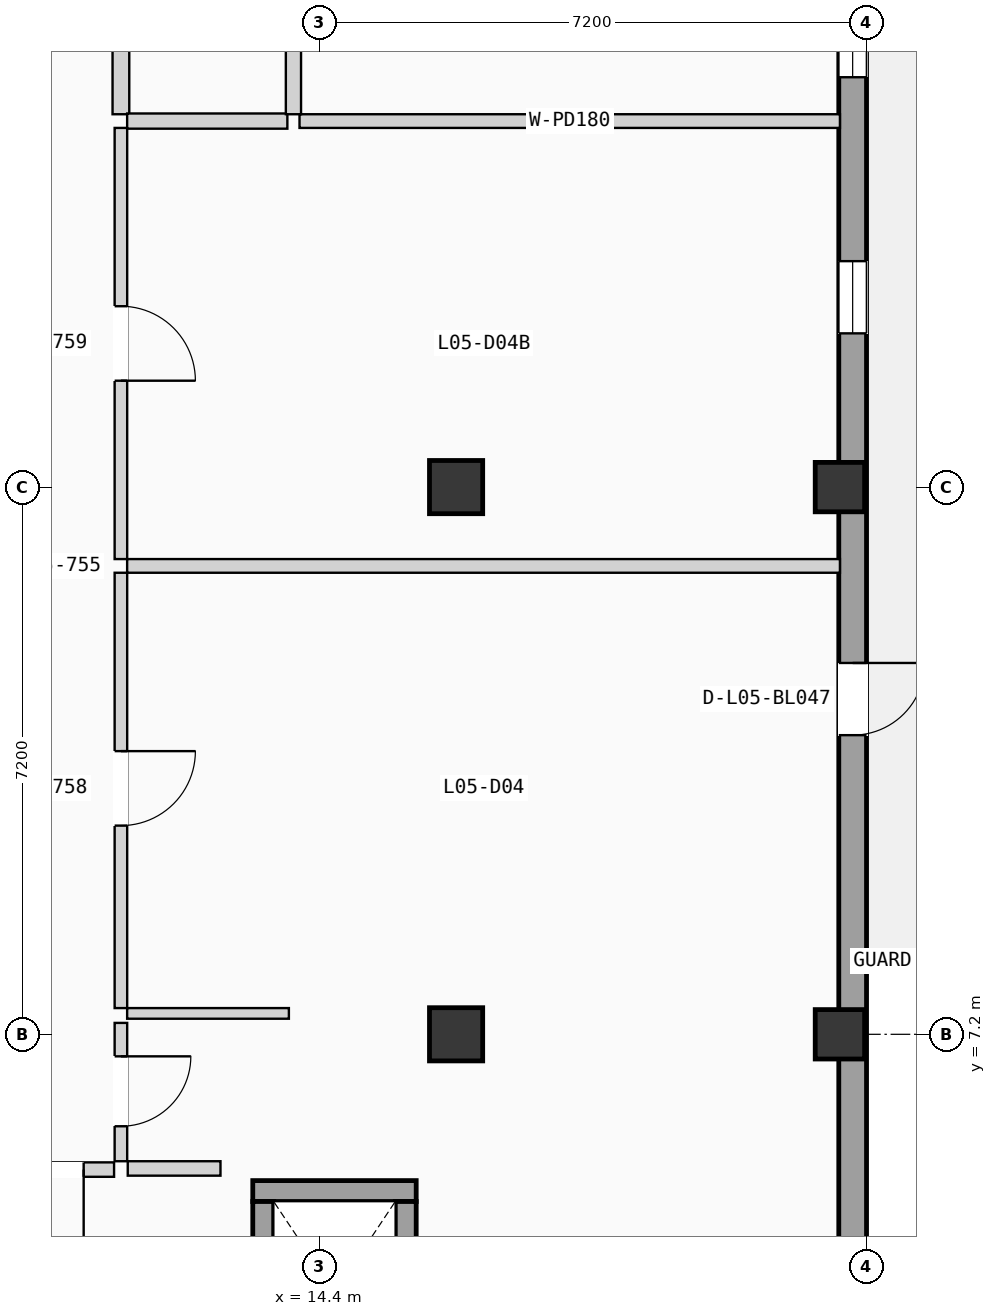
"""IFC4 building model, lengths in metres.
Left out: names, types, materials, properties, quantities, classifications, styles, units other than length and angle.
Written with IfcOpenShell. Run it as: python <this file> out.ifc"""

import sys

from ifc_helpers import new_model, si_unit, direction, frame, frame_2d, origin, origin_2d, place, context, subcontext, project, spatial, rectangle, extrude, element, fill, save


model = new_model("IFC4")
c1 = context("Model", 3, precision=1e-05, world=origin(), true_north=direction((0.0, 1.0)))
c2 = subcontext(c1, "Body", "Model", "MODEL_VIEW")
j1 = project(units=[si_unit("LENGTHUNIT", "METRE"), si_unit("PLANEANGLEUNIT", "RADIAN")], contexts=[c1])
p1 = place(None, origin())
s1 = spatial("IfcSite", under=j1, at=p1, CompositionType="ELEMENT")
p2 = place(p1, origin())
s2 = spatial("IfcBuilding", under=s1, at=p2, CompositionType="ELEMENT")
p3 = place(p2, frame((0.0, 0.0, 18.375)))
s3 = spatial("IfcBuildingStorey", under=s2, at=p3, CompositionType="ELEMENT", Elevation=18.375)
for number, where, z_axis, x_axis in (
    (1, (16.2, 7.2, 0.0), (0.0, 0.0, 1.0), (1.0, 0.0, 0.0)),
    (2, (16.2, 14.4, 0.0), (0.0, 0.0, 1.0), (1.0, 0.0, 0.0)),
):
    element("IfcColumn", number, at=place(p3, frame(where, z_axis=z_axis, x_axis=x_axis)), inside=s3, PredefinedType="COLUMN", context=c2, shape_type="SweptSolid", body=[
        extrude(rectangle(XDim=0.7, YDim=0.7, at=origin_2d()), origin(), (0.0, 0.0, 1.0), 3.15),
    ])
for number, where, z_axis, x_axis in (
    (3, (21.25, 7.2, 0.0), (0.0, 0.0, 1.0), (1.0, 0.0, 0.0)),
    (4, (21.25, 14.4, 0.0), (0.0, 0.0, 1.0), (1.0, 0.0, 0.0)),
):
    element("IfcColumn", number, at=place(p3, frame(where, z_axis=z_axis, x_axis=x_axis)), inside=s3, PredefinedType="COLUMN", context=c2, shape_type="SweptSolid", body=[
        extrude(rectangle(XDim=0.65, YDim=0.65, at=origin_2d()), origin(), (0.0, 0.0, 1.0), 3.15),
    ])
p4 = place(p3, frame((21.417, 0.365, 0.0), z_axis=(0.0, 0.0, 1.0), x_axis=(0.0, 1.0, 0.0)))
e5 = element("IfcWall", 5, at=p4, inside=s3, PredefinedType="SOLIDWALL", context=c2, shape_type="SweptSolid", body=[
    extrude(rectangle(XDim=49.67, YDim=0.365, at=frame_2d((24.835, 0.0))), origin(), (0.0, 0.0, 1.0), 2.89),
])
p5 = place(p4, frame((10.771, 0.0, 0.0)))
e6 = element("IfcOpeningElement", 6, at=p5, cuts=e5, PredefinedType="OPENING", context=c2, shape_type="SweptSolid", body=[
    extrude(rectangle(XDim=0.95, YDim=2.15, at=frame_2d((0.475, 1.075))), frame((0.0, 0.192, 0.0), z_axis=(0.0, -1.0, 0.0), x_axis=(1.0, 0.0, 0.0)), (0.0, 0.0, 1.0), 0.385),
])
p6 = place(p4, frame((16.058, 0.0, 0.555)))
e7 = element("IfcOpeningElement", 7, at=p6, cuts=e5, PredefinedType="OPENING", context=c2, shape_type="SweptSolid", body=[
    extrude(rectangle(XDim=0.95, YDim=1.65, at=frame_2d((0.475, 0.825))), frame((0.0, 0.192, 0.0), z_axis=(0.0, -1.0, 0.0), x_axis=(1.0, 0.0, 0.0)), (0.0, 0.0, 1.0), 0.385),
])
p7 = place(p4, frame((24.36, 0.0, 0.85)))
e8 = element("IfcOpeningElement", 8, at=p7, cuts=e5, PredefinedType="OPENING", context=c2, shape_type="SweptSolid", body=[
    extrude(rectangle(XDim=0.95, YDim=1.2, at=frame_2d((0.475, 0.6))), frame((0.0, 0.192, 0.0), z_axis=(0.0, -1.0, 0.0), x_axis=(1.0, 0.0, 0.0)), (0.0, 0.0, 1.0), 0.385),
])
p8 = place(p4, frame((19.428, 0.0, 0.9)))
e9 = element("IfcOpeningElement", 9, at=p8, cuts=e5, PredefinedType="OPENING", context=c2, shape_type="SweptSolid", body=[
    extrude(rectangle(XDim=1.05, YDim=1.2, at=frame_2d((0.525, 0.6))), frame((0.0, 0.192, 0.0), z_axis=(0.0, -1.0, 0.0), x_axis=(1.0, 0.0, 0.0)), (0.0, 0.0, 1.0), 0.385),
])
p9 = place(p4, frame((29.192, 0.0, 0.855)))
e10 = element("IfcOpeningElement", 10, at=p9, cuts=e5, PredefinedType="OPENING", context=c2, shape_type="SweptSolid", body=[
    extrude(rectangle(XDim=1.05, YDim=1.35, at=frame_2d((0.525, 0.675))), frame((0.0, 0.192, 0.0), z_axis=(0.0, -1.0, 0.0), x_axis=(1.0, 0.0, 0.0)), (0.0, 0.0, 1.0), 0.385),
])
p10 = place(p4, frame((37.218, 0.0, 0.0)))
e11 = element("IfcOpeningElement", 11, at=p10, cuts=e5, PredefinedType="OPENING", context=c2, shape_type="SweptSolid", body=[
    extrude(rectangle(XDim=1.08, YDim=2.18, at=frame_2d((0.54, 1.09))), frame((0.0, 0.192, 0.0), z_axis=(0.0, -1.0, 0.0), x_axis=(1.0, 0.0, 0.0)), (0.0, 0.0, 1.0), 0.385),
])
p11 = place(p4, frame((32.13, 0.0, 0.705)))
e12 = element("IfcOpeningElement", 12, at=p11, cuts=e5, PredefinedType="OPENING", context=c2, shape_type="SweptSolid", body=[
    extrude(rectangle(XDim=1.05, YDim=1.5, at=frame_2d((0.525, 0.75))), frame((0.0, 0.192, 0.0), z_axis=(0.0, -1.0, 0.0), x_axis=(1.0, 0.0, 0.0)), (0.0, 0.0, 1.0), 0.385),
])
p12 = place(p4, frame((40.163, 0.0, 0.555)))
e13 = element("IfcOpeningElement", 13, at=p12, cuts=e5, PredefinedType="OPENING", context=c2, shape_type="SweptSolid", body=[
    extrude(rectangle(XDim=1.05, YDim=1.65, at=frame_2d((0.525, 0.825))), frame((0.0, 0.192, 0.0), z_axis=(0.0, -1.0, 0.0), x_axis=(1.0, 0.0, 0.0)), (0.0, 0.0, 1.0), 0.385),
])
p13 = place(p3, frame((13.525, 5.137, 0.0), z_axis=(0.0, 0.0, 1.0), x_axis=(1.0, 0.0, 0.0)))
e14 = element("IfcWall", 14, at=p13, inside=s3, PredefinedType="SHEAR", context=c2, shape_type="SweptSolid", body=[
    extrude(rectangle(XDim=2.15, YDim=0.275, at=frame_2d((1.075, 0.0))), origin(), (0.0, 0.0, 1.0), 2.89),
])
p14 = place(p3, frame((13.663, 2.6, 0.0), z_axis=(0.0, 0.0, 1.0), x_axis=(0.0, 1.0, 0.0)))
e15 = element("IfcWall", 15, at=p14, inside=s3, PredefinedType="SHEAR", context=c2, shape_type="SweptSolid", body=[
    extrude(rectangle(XDim=2.4, YDim=0.275, at=frame_2d((1.2, 0.0))), origin(), (0.0, 0.0, 1.0), 2.89),
])
p15 = place(p14, frame((0.65, 0.0, 0.0)))
e16 = element("IfcOpeningElement", 16, at=p15, cuts=e15, PredefinedType="OPENING", context=c2, shape_type="SweptSolid", body=[
    extrude(rectangle(XDim=1.1, YDim=2.15, at=frame_2d((0.55, 1.075))), frame((0.0, 0.147, 0.0), z_axis=(0.0, -1.0, 0.0), x_axis=(1.0, 0.0, 0.0)), (0.0, 0.0, 1.0), 0.295),
])
p16 = place(p3, frame((15.538, 2.6, 0.0), z_axis=(0.0, 0.0, 1.0), x_axis=(0.0, 1.0, 0.0)))
e17 = element("IfcWall", 17, at=p16, inside=s3, PredefinedType="SHEAR", context=c2, shape_type="SweptSolid", body=[
    extrude(rectangle(XDim=2.4, YDim=0.275, at=frame_2d((1.2, 0.0))), origin(), (0.0, 0.0, 1.0), 2.89),
])
p17 = place(p3, frame((11.88, 5.435, 0.0), z_axis=(0.0, 0.0, 1.0), x_axis=(1.0, 0.0, 0.0)))
e18 = element("IfcWall", 18, at=p17, inside=s3, PredefinedType="PARTITIONING", context=c2, shape_type="SweptSolid", body=[
    extrude(rectangle(XDim=1.22, YDim=0.19, at=frame_2d((0.61, 0.0))), origin(), (0.0, 0.0, 1.0), 2.87),
])
p18 = place(p3, frame((9.7, 5.42, 0.0), z_axis=(0.0, 0.0, 1.0), x_axis=(1.0, 0.0, 0.0)))
e19 = element("IfcWall", 19, at=p18, inside=s3, PredefinedType="PARTITIONING", context=c2, shape_type="SweptSolid", body=[
    extrude(rectangle(XDim=2.0, YDim=0.19, at=frame_2d((1.0, 0.0))), origin(), (0.0, 0.0, 1.0), 2.87),
])
p19 = place(p18, frame((0.5, 0.0, 0.0)))
e20 = element("IfcOpeningElement", 20, at=p19, cuts=e19, PredefinedType="OPENING", context=c2, shape_type="SweptSolid", body=[
    extrude(rectangle(XDim=1.1, YDim=2.12, at=frame_2d((0.55, 1.06))), frame((0.0, 0.105, 0.0), z_axis=(0.0, -1.0, 0.0), x_axis=(1.0, 0.0, 0.0)), (0.0, 0.0, 1.0), 0.21),
])
p20 = place(p3, frame((11.79, 5.53, 0.0), z_axis=(0.0, 0.0, 1.0), x_axis=(0.0, 1.0, 0.0)))
e21 = element("IfcWall", 21, at=p20, inside=s3, PredefinedType="PARTITIONING", context=c2, shape_type="SweptSolid", body=[
    extrude(rectangle(XDim=1.82, YDim=0.165, at=frame_2d((0.91, 0.0))), origin(), (0.0, 0.0, 1.0), 2.87),
])
p21 = place(p20, frame((0.46, 0.0, 0.0)))
e22 = element("IfcOpeningElement", 22, at=p21, cuts=e21, PredefinedType="OPENING", context=c2, shape_type="SweptSolid", body=[
    extrude(rectangle(XDim=0.92, YDim=2.04, at=frame_2d((0.46, 1.02))), frame((0.0, 0.093, 0.0), z_axis=(0.0, -1.0, 0.0), x_axis=(1.0, 0.0, 0.0)), (0.0, 0.0, 1.0), 0.185),
])
p22 = place(p3, frame((11.872, 7.475, 0.0), z_axis=(0.0, 0.0, 1.0), x_axis=(1.0, 0.0, 0.0)))
e23 = element("IfcWall", 23, at=p22, inside=s3, PredefinedType="PARTITIONING", context=c2, shape_type="SweptSolid", body=[
    extrude(rectangle(XDim=2.128, YDim=0.14, at=frame_2d((1.064, 0.0))), origin(), (0.0, 0.0, 1.0), 2.87),
])
p23 = place(p3, frame((11.79, 7.545, 0.0), z_axis=(0.0, 0.0, 1.0), x_axis=(0.0, 1.0, 0.0)))
e24 = element("IfcWall", 24, at=p23, inside=s3, PredefinedType="PARTITIONING", context=c2, shape_type="SweptSolid", body=[
    extrude(rectangle(XDim=5.728, YDim=0.165, at=frame_2d((2.864, 0.0))), origin(), (0.0, 0.0, 1.0), 2.87),
])
p24 = place(p23, frame((2.401, 0.0, 0.0)))
e25 = element("IfcOpeningElement", 25, at=p24, cuts=e24, PredefinedType="OPENING", context=c2, shape_type="SweptSolid", body=[
    extrude(rectangle(XDim=0.98, YDim=2.08, at=frame_2d((0.49, 1.04))), frame((0.0, 0.093, 0.0), z_axis=(0.0, -1.0, 0.0), x_axis=(1.0, 0.0, 0.0)), (0.0, 0.0, 1.0), 0.185),
])
p25 = place(p3, frame((11.79, 13.453, 0.0), z_axis=(0.0, 0.0, 1.0), x_axis=(0.0, 1.0, 0.0)))
e26 = element("IfcWall", 26, at=p25, inside=s3, PredefinedType="PARTITIONING", context=c2, shape_type="SweptSolid", body=[
    extrude(rectangle(XDim=5.673, YDim=0.165, at=frame_2d((2.836, 0.0))), origin(), (0.0, 0.0, 1.0), 2.87),
])
p26 = place(p25, frame((2.347, 0.0, 0.0)))
e27 = element("IfcOpeningElement", 27, at=p26, cuts=e26, PredefinedType="OPENING", context=c2, shape_type="SweptSolid", body=[
    extrude(rectangle(XDim=0.98, YDim=2.08, at=frame_2d((0.49, 1.04))), frame((0.0, 0.093, 0.0), z_axis=(0.0, -1.0, 0.0), x_axis=(1.0, 0.0, 0.0)), (0.0, 0.0, 1.0), 0.185),
])
p27 = place(p3, frame((11.79, 19.306, 0.0), z_axis=(0.0, 0.0, 1.0), x_axis=(0.0, 1.0, 0.0)))
e28 = element("IfcWall", 28, at=p27, inside=s3, PredefinedType="PLUMBINGWALL", context=c2, shape_type="SweptSolid", body=[
    extrude(rectangle(XDim=3.574, YDim=0.22, at=frame_2d((1.787, 0.0))), origin(), (0.0, 0.0, 1.0), 2.87),
])
p28 = place(p3, frame((11.872, 13.363, 0.0), z_axis=(0.0, 0.0, 1.0), x_axis=(1.0, 0.0, 0.0)))
e29 = element("IfcWall", 29, at=p28, inside=s3, PredefinedType="PARTITIONING", context=c2, shape_type="SweptSolid", body=[
    extrude(rectangle(XDim=9.378, YDim=0.18, at=frame_2d((4.689, 0.0))), origin(), (0.0, 0.0, 1.0), 2.87),
])
p29 = place(p3, frame((11.872, 19.216, 0.0), z_axis=(0.0, 0.0, 1.0), x_axis=(1.0, 0.0, 0.0)))
e30 = element("IfcWall", 30, at=p29, inside=s3, PredefinedType="PLUMBINGWALL", context=c2, shape_type="SweptSolid", body=[
    extrude(rectangle(XDim=2.108, YDim=0.2, at=frame_2d((1.054, 0.0))), origin(), (0.0, 0.0, 1.0), 2.87),
])
p30 = place(p3, frame((14.14, 19.216, 0.0), z_axis=(0.0, 0.0, 1.0), x_axis=(1.0, 0.0, 0.0)))
e31 = element("IfcWall", 31, at=p30, inside=s3, PredefinedType="PARTITIONING", context=c2, shape_type="SweptSolid", body=[
    extrude(rectangle(XDim=7.11, YDim=0.18, at=frame_2d((3.555, 0.0))), origin(), (0.0, 0.0, 1.0), 2.87),
])
p31 = place(p3, frame((14.06, 19.306, 0.0), z_axis=(0.0, 0.0, 1.0), x_axis=(0.0, 1.0, 0.0)))
e32 = element("IfcWall", 32, at=p31, inside=s3, PredefinedType="PLUMBINGWALL", context=c2, shape_type="SweptSolid", body=[
    extrude(rectangle(XDim=3.579, YDim=0.2, at=frame_2d((1.79, 0.0))), origin(), (0.0, 0.0, 1.0), 2.87),
])
p32 = place(p5, frame((0.95, 0.0, 0.0), z_axis=(0.0, 0.0, 1.0), x_axis=(-1.0, 0.0, 0.0)))
e33 = element("IfcDoor", 33, at=p32, inside=s3, OperationType="SINGLE_SWING_RIGHT", PredefinedType="DOOR", context=c2, shape_type="SweptSolid", body=[
    extrude(rectangle(XDim=0.95, YDim=2.15, at=frame_2d((0.475, 1.075))), frame((0.0, 0.025, 0.0), z_axis=(0.0, -1.0, 0.0), x_axis=(1.0, 0.0, 0.0)), (0.0, 0.0, 1.0), 0.05),
])
fill(e6, e33)
p33 = place(p6, origin())
e34 = element("IfcWindow", 34, at=p33, inside=s3, PartitioningType="SINGLE_PANEL", PredefinedType="WINDOW", context=c2, shape_type="SweptSolid", body=[
    extrude(rectangle(XDim=0.95, YDim=1.65, at=frame_2d((0.475, 0.825))), frame((0.0, 0.03, 0.0), z_axis=(0.0, -1.0, 0.0), x_axis=(1.0, 0.0, 0.0)), (0.0, 0.0, 1.0), 0.06),
])
fill(e7, e34)
p34 = place(p8, origin())
e35 = element("IfcWindow", 35, at=p34, inside=s3, PartitioningType="SINGLE_PANEL", PredefinedType="WINDOW", context=c2, shape_type="SweptSolid", body=[
    extrude(rectangle(XDim=1.05, YDim=1.2, at=frame_2d((0.525, 0.6))), frame((0.0, 0.03, 0.0), z_axis=(0.0, -1.0, 0.0), x_axis=(1.0, 0.0, 0.0)), (0.0, 0.0, 1.0), 0.06),
])
fill(e9, e35)
p35 = place(p19, frame((1.1, 0.0, 0.0), z_axis=(0.0, 0.0, 1.0), x_axis=(-1.0, 0.0, 0.0)))
e36 = element("IfcDoor", 36, at=p35, inside=s3, OperationType="SINGLE_SWING_RIGHT", PredefinedType="DOOR", context=c2, shape_type="SweptSolid", body=[
    extrude(rectangle(XDim=1.1, YDim=2.12, at=frame_2d((0.55, 1.06))), frame((0.0, 0.025, 0.0), z_axis=(0.0, -1.0, 0.0), x_axis=(1.0, 0.0, 0.0)), (0.0, 0.0, 1.0), 0.05),
])
fill(e20, e36)
p36 = place(p21, frame((0.92, 0.0, 0.0), z_axis=(0.0, 0.0, 1.0), x_axis=(-1.0, 0.0, 0.0)))
e37 = element("IfcDoor", 37, at=p36, inside=s3, OperationType="SINGLE_SWING_RIGHT", PredefinedType="DOOR", context=c2, shape_type="SweptSolid", body=[
    extrude(rectangle(XDim=0.92, YDim=2.04, at=frame_2d((0.46, 1.02))), frame((0.0, 0.025, 0.0), z_axis=(0.0, -1.0, 0.0), x_axis=(1.0, 0.0, 0.0)), (0.0, 0.0, 1.0), 0.05),
])
fill(e22, e37)
p37 = place(p24, frame((0.98, 0.0, 0.0), z_axis=(0.0, 0.0, 1.0), x_axis=(-1.0, 0.0, 0.0)))
e38 = element("IfcDoor", 38, at=p37, inside=s3, OperationType="SINGLE_SWING_RIGHT", PredefinedType="DOOR", context=c2, shape_type="SweptSolid", body=[
    extrude(rectangle(XDim=0.98, YDim=2.08, at=frame_2d((0.49, 1.04))), frame((0.0, 0.025, 0.0), z_axis=(0.0, -1.0, 0.0), x_axis=(1.0, 0.0, 0.0)), (0.0, 0.0, 1.0), 0.05),
])
fill(e25, e38)
p38 = place(p26, frame((0.98, 0.0, 0.0), z_axis=(0.0, 0.0, 1.0), x_axis=(-1.0, 0.0, 0.0)))
e39 = element("IfcDoor", 39, at=p38, inside=s3, OperationType="SINGLE_SWING_LEFT", PredefinedType="DOOR", context=c2, shape_type="SweptSolid", body=[
    extrude(rectangle(XDim=0.98, YDim=2.08, at=frame_2d((0.49, 1.04))), frame((0.0, 0.025, 0.0), z_axis=(0.0, -1.0, 0.0), x_axis=(1.0, 0.0, 0.0)), (0.0, 0.0, 1.0), 0.05),
])
fill(e27, e39)
save(model, sys.argv[1])
